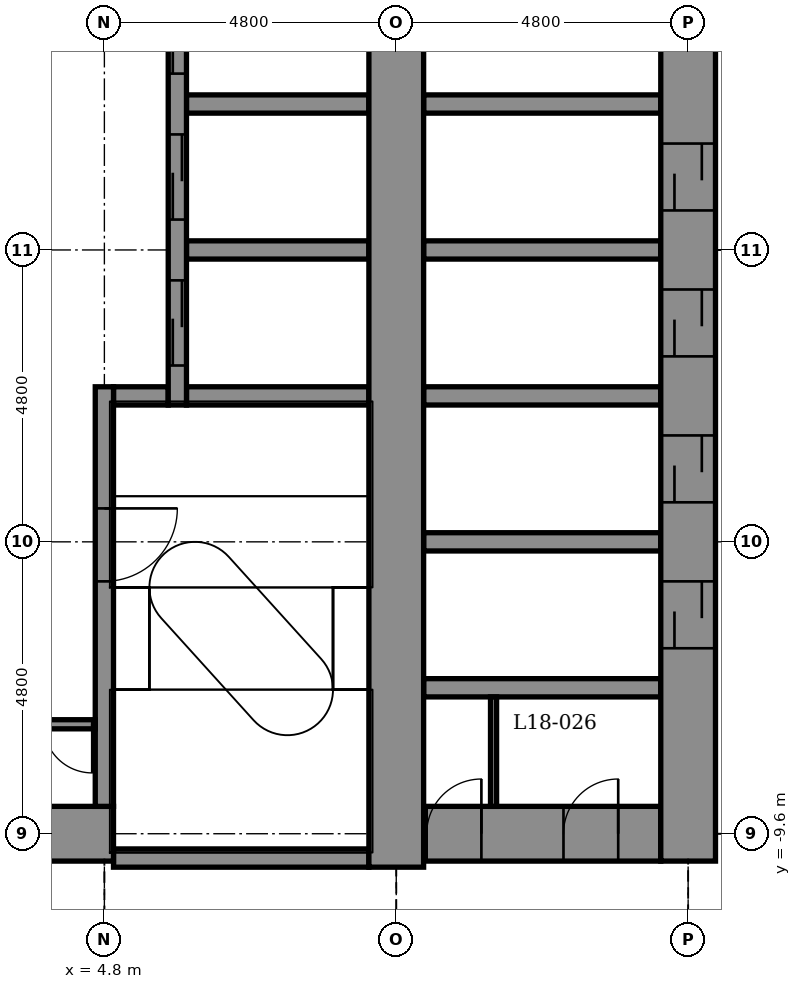
"""IFC4 building model, lengths in metres.
Left out: names, types, materials, properties, quantities, classifications, styles, units other than length and angle.
Written with IfcOpenShell. Run it as: python <this file> out.ifc"""

import sys

from ifc_helpers import new_model, si_unit, direction, frame, frame_2d, origin, place, context, subcontext, project, spatial, rectangle, extrude, element, fill, save


model = new_model("IFC4")
c1 = context("Model", 3, precision=1e-05, world=origin(), true_north=direction((0.0, 1.0)))
c2 = subcontext(c1, "Body", "Model", "MODEL_VIEW")
j1 = project(units=[si_unit("LENGTHUNIT", "METRE"), si_unit("PLANEANGLEUNIT", "RADIAN")], contexts=[c1])
p1 = place(None, origin())
s1 = spatial("IfcSite", under=j1, at=p1, CompositionType="ELEMENT")
p2 = place(p1, origin())
s2 = spatial("IfcBuilding", under=s1, at=p2, CompositionType="ELEMENT")
p3 = place(p2, frame((0.0, 0.0, 95.9)))
s3 = spatial("IfcBuildingStorey", under=s2, at=p3, CompositionType="ELEMENT", Elevation=95.9)
p4 = place(p3, frame((4.95, -10.0, -0.2), z_axis=(0.0, 0.0, 1.0), x_axis=(1.0, 0.0, 0.0)))
e1 = element("IfcWall", 1, at=p4, inside=s3, PredefinedType="STANDARD", context=c2, shape_type="SweptSolid", body=[
    extrude(rectangle(XDim=4.2, YDim=0.3, at=frame_2d((2.1, 0.0))), origin(), (0.0, 0.0, 1.0), 4.5),
])
p5 = place(p3, frame((-5.25, -9.6, -0.2), z_axis=(0.0, 0.0, 1.0), x_axis=(1.0, 0.0, 0.0)))
e2 = element("IfcWall", 2, at=p5, inside=s3, PredefinedType="SHEAR", context=c2, shape_type="SweptSolid", body=[
    extrude(rectangle(XDim=10.2, YDim=0.9, at=frame_2d((5.1, 0.0))), origin(), (0.0, 0.0, 1.0), 4.5),
])
p6 = place(p5, frame((0.6, 0.0, 0.2)))
e3 = element("IfcOpeningElement", 3, at=p6, cuts=e2, PredefinedType="OPENING", context=c2, shape_type="SweptSolid", body=[
    extrude(rectangle(XDim=0.9, YDim=2.1, at=frame_2d((0.45, 1.05))), frame((0.0, 0.46, 0.0), z_axis=(0.0, -1.0, 0.0), x_axis=(1.0, 0.0, 0.0)), (0.0, 0.0, 1.0), 0.92),
])
p7 = place(p3, frame((10.05, -9.6, -0.2), z_axis=(0.0, 0.0, 1.0), x_axis=(1.0, 0.0, 0.0)))
e4 = element("IfcWall", 4, at=p7, inside=s3, PredefinedType="SHEAR", context=c2, shape_type="SweptSolid", body=[
    extrude(rectangle(XDim=3.9, YDim=0.9, at=frame_2d((1.95, 0.0))), origin(), (0.0, 0.0, 1.0), 4.5),
])
p8 = place(p7, frame((0.05, 0.0, 0.2)))
e5 = element("IfcOpeningElement", 5, at=p8, cuts=e4, PredefinedType="OPENING", context=c2, shape_type="SweptSolid", body=[
    extrude(rectangle(XDim=0.9, YDim=2.1, at=frame_2d((0.45, 1.05))), frame((0.0, 0.46, 0.0), z_axis=(0.0, -1.0, 0.0), x_axis=(1.0, 0.0, 0.0)), (0.0, 0.0, 1.0), 0.92),
])
p9 = place(p7, frame((2.3, 0.0, 0.2)))
e6 = element("IfcOpeningElement", 6, at=p9, cuts=e4, PredefinedType="OPENING", context=c2, shape_type="SweptSolid", body=[
    extrude(rectangle(XDim=0.9, YDim=2.1, at=frame_2d((0.45, 1.05))), frame((0.0, 0.46, 0.0), z_axis=(0.0, -1.0, 0.0), x_axis=(1.0, 0.0, 0.0)), (0.0, 0.0, 1.0), 0.92),
])
for number, where, z_axis, x_axis in (
    (7, (10.05, -7.2, -0.2), (0.0, 0.0, 1.0), (1.0, 0.0, 0.0)),
    (8, (10.05, -4.8, -0.2), (0.0, 0.0, 1.0), (1.0, 0.0, 0.0)),
):
    element("IfcWall", number, at=place(p3, frame(where, z_axis=z_axis, x_axis=x_axis)), inside=s3, PredefinedType="STANDARD", context=c2, shape_type="SweptSolid", body=[
        extrude(rectangle(XDim=3.9, YDim=0.3, at=frame_2d((1.95, 0.0))), origin(), (0.0, 0.0, 1.0), 4.5),
    ])
p10 = place(p3, frame((4.95, -2.4, -0.2), z_axis=(0.0, 0.0, 1.0), x_axis=(1.0, 0.0, 0.0)))
e9 = element("IfcWall", 9, at=p10, inside=s3, PredefinedType="STANDARD", context=c2, shape_type="SweptSolid", body=[
    extrude(rectangle(XDim=0.9, YDim=0.3, at=frame_2d((0.45, 0.0))), origin(), (0.0, 0.0, 1.0), 4.5),
])
p11 = place(p3, frame((6.15, -2.4, -0.2), z_axis=(0.0, 0.0, 1.0), x_axis=(1.0, 0.0, 0.0)))
e10 = element("IfcWall", 10, at=p11, inside=s3, PredefinedType="STANDARD", context=c2, shape_type="SweptSolid", body=[
    extrude(rectangle(XDim=3.0, YDim=0.3, at=frame_2d((1.5, 0.0))), origin(), (0.0, 0.0, 1.0), 4.5),
])
p12 = place(p3, frame((10.05, -2.4, -0.2), z_axis=(0.0, 0.0, 1.0), x_axis=(1.0, 0.0, 0.0)))
e11 = element("IfcWall", 11, at=p12, inside=s3, PredefinedType="STANDARD", context=c2, shape_type="SweptSolid", body=[
    extrude(rectangle(XDim=3.9, YDim=0.3, at=frame_2d((1.95, 0.0))), origin(), (0.0, 0.0, 1.0), 4.5),
])
p13 = place(p3, frame((6.15, 0.0, -0.2), z_axis=(0.0, 0.0, 1.0), x_axis=(1.0, 0.0, 0.0)))
e12 = element("IfcWall", 12, at=p13, inside=s3, PredefinedType="STANDARD", context=c2, shape_type="SweptSolid", body=[
    extrude(rectangle(XDim=3.0, YDim=0.3, at=frame_2d((1.5, 0.0))), origin(), (0.0, 0.0, 1.0), 4.5),
])
p14 = place(p3, frame((10.05, 0.0, -0.2), z_axis=(0.0, 0.0, 1.0), x_axis=(1.0, 0.0, 0.0)))
e13 = element("IfcWall", 13, at=p14, inside=s3, PredefinedType="STANDARD", context=c2, shape_type="SweptSolid", body=[
    extrude(rectangle(XDim=3.9, YDim=0.3, at=frame_2d((1.95, 0.0))), origin(), (0.0, 0.0, 1.0), 4.5),
])
p15 = place(p3, frame((6.15, 2.4, -0.2), z_axis=(0.0, 0.0, 1.0), x_axis=(1.0, 0.0, 0.0)))
e14 = element("IfcWall", 14, at=p15, inside=s3, PredefinedType="STANDARD", context=c2, shape_type="SweptSolid", body=[
    extrude(rectangle(XDim=3.0, YDim=0.3, at=frame_2d((1.5, 0.0))), origin(), (0.0, 0.0, 1.0), 4.5),
])
p16 = place(p3, frame((10.05, 2.4, -0.2), z_axis=(0.0, 0.0, 1.0), x_axis=(1.0, 0.0, 0.0)))
e15 = element("IfcWall", 15, at=p16, inside=s3, PredefinedType="STANDARD", context=c2, shape_type="SweptSolid", body=[
    extrude(rectangle(XDim=3.9, YDim=0.3, at=frame_2d((1.95, 0.0))), origin(), (0.0, 0.0, 1.0), 4.5),
])
p17 = place(p3, frame((4.8, -9.15, -0.2), z_axis=(0.0, 0.0, 1.0), x_axis=(0.0, 1.0, 0.0)))
e16 = element("IfcWall", 16, at=p17, inside=s3, PredefinedType="STANDARD", context=c2, shape_type="SweptSolid", body=[
    extrude(rectangle(XDim=6.9, YDim=0.3, at=frame_2d((3.45, 0.0))), origin(), (0.0, 0.0, 1.0), 4.5),
])
p18 = place(p17, frame((3.7, 0.0, 0.2)))
e17 = element("IfcOpeningElement", 17, at=p18, cuts=e16, PredefinedType="OPENING", context=c2, shape_type="SweptSolid", body=[
    extrude(rectangle(XDim=1.2, YDim=2.1, at=frame_2d((0.6, 1.05))), frame((0.0, 0.16, 0.0), z_axis=(0.0, -1.0, 0.0), x_axis=(1.0, 0.0, 0.0)), (0.0, 0.0, 1.0), 0.32),
])
p19 = place(p3, frame((6.0, -2.55, -0.2), z_axis=(0.0, 0.0, 1.0), x_axis=(0.0, 1.0, 0.0)))
e18 = element("IfcWall", 18, at=p19, inside=s3, PredefinedType="STANDARD", context=c2, shape_type="SweptSolid", body=[
    extrude(rectangle(XDim=7.5, YDim=0.3, at=frame_2d((3.75, 0.0))), origin(), (0.0, 0.0, 1.0), 4.5),
])
p20 = place(p19, frame((0.65, 0.0, 0.2)))
e19 = element("IfcOpeningElement", 19, at=p20, cuts=e18, PredefinedType="OPENING", context=c2, shape_type="SweptSolid", body=[
    extrude(rectangle(XDim=1.4, YDim=2.1, at=frame_2d((0.7, 1.05))), frame((0.0, 0.16, 0.0), z_axis=(0.0, -1.0, 0.0), x_axis=(1.0, 0.0, 0.0)), (0.0, 0.0, 1.0), 0.32),
])
p21 = place(p19, frame((3.05, 0.0, 0.2)))
e20 = element("IfcOpeningElement", 20, at=p21, cuts=e18, PredefinedType="OPENING", context=c2, shape_type="SweptSolid", body=[
    extrude(rectangle(XDim=1.4, YDim=2.1, at=frame_2d((0.7, 1.05))), frame((0.0, 0.16, 0.0), z_axis=(0.0, -1.0, 0.0), x_axis=(1.0, 0.0, 0.0)), (0.0, 0.0, 1.0), 0.32),
])
p22 = place(p19, frame((5.45, 0.0, 0.2)))
e21 = element("IfcOpeningElement", 21, at=p22, cuts=e18, PredefinedType="OPENING", context=c2, shape_type="SweptSolid", body=[
    extrude(rectangle(XDim=1.4, YDim=2.1, at=frame_2d((0.7, 1.05))), frame((0.0, 0.16, 0.0), z_axis=(0.0, -1.0, 0.0), x_axis=(1.0, 0.0, 0.0)), (0.0, 0.0, 1.0), 0.32),
])
p23 = place(p3, frame((9.6, -10.15, -0.2), z_axis=(0.0, 0.0, 1.0), x_axis=(0.0, 1.0, 0.0)))
e22 = element("IfcWall", 22, at=p23, inside=s3, PredefinedType="SHEAR", context=c2, shape_type="SweptSolid", body=[
    extrude(rectangle(XDim=20.2, YDim=0.9, at=frame_2d((10.1, 0.0))), origin(), (0.0, 0.0, 1.0), 4.5),
])
p24 = place(p3, frame((14.4, -10.05, -0.2), z_axis=(0.0, 0.0, 1.0), x_axis=(0.0, 1.0, 0.0)))
e23 = element("IfcWall", 23, at=p24, inside=s3, PredefinedType="SHEAR", context=c2, shape_type="SweptSolid", body=[
    extrude(rectangle(XDim=20.1, YDim=0.9, at=frame_2d((10.05, 0.0))), origin(), (0.0, 0.0, 1.0), 4.5),
])
p25 = place(p24, frame((3.5, 0.0, 0.2)))
e24 = element("IfcOpeningElement", 24, at=p25, cuts=e23, PredefinedType="OPENING", context=c2, shape_type="SweptSolid", body=[
    extrude(rectangle(XDim=1.1, YDim=2.1, at=frame_2d((0.55, 1.05))), frame((0.0, 0.46, 0.0), z_axis=(0.0, -1.0, 0.0), x_axis=(1.0, 0.0, 0.0)), (0.0, 0.0, 1.0), 0.92),
])
p26 = place(p24, frame((5.9, 0.0, 0.2)))
e25 = element("IfcOpeningElement", 25, at=p26, cuts=e23, PredefinedType="OPENING", context=c2, shape_type="SweptSolid", body=[
    extrude(rectangle(XDim=1.1, YDim=2.1, at=frame_2d((0.55, 1.05))), frame((0.0, 0.46, 0.0), z_axis=(0.0, -1.0, 0.0), x_axis=(1.0, 0.0, 0.0)), (0.0, 0.0, 1.0), 0.92),
])
p27 = place(p24, frame((8.3, 0.0, 0.2)))
e26 = element("IfcOpeningElement", 26, at=p27, cuts=e23, PredefinedType="OPENING", context=c2, shape_type="SweptSolid", body=[
    extrude(rectangle(XDim=1.1, YDim=2.1, at=frame_2d((0.55, 1.05))), frame((0.0, 0.46, 0.0), z_axis=(0.0, -1.0, 0.0), x_axis=(1.0, 0.0, 0.0)), (0.0, 0.0, 1.0), 0.92),
])
p28 = place(p24, frame((10.7, 0.0, 0.2)))
e27 = element("IfcOpeningElement", 27, at=p28, cuts=e23, PredefinedType="OPENING", context=c2, shape_type="SweptSolid", body=[
    extrude(rectangle(XDim=1.1, YDim=2.1, at=frame_2d((0.55, 1.05))), frame((0.0, 0.46, 0.0), z_axis=(0.0, -1.0, 0.0), x_axis=(1.0, 0.0, 0.0)), (0.0, 0.0, 1.0), 0.92),
])
p29 = place(p3, frame((11.2, -9.15, 0.0), z_axis=(0.0, 0.0, 1.0), x_axis=(0.0, 1.0, 0.0)))
e28 = element("IfcWall", 28, at=p29, inside=s3, PredefinedType="PARTITIONING", context=c2, shape_type="SweptSolid", body=[
    extrude(rectangle(XDim=1.8, YDim=0.1, at=frame_2d((0.9, 0.0))), origin(), (0.0, 0.0, 1.0), 4.3),
])
p30 = place(p3, frame((3.75, -7.8, 0.0), z_axis=(0.0, 0.0, 1.0), x_axis=(1.0, 0.0, 0.0)))
e29 = element("IfcWall", 29, at=p30, inside=s3, PredefinedType="PARTITIONING", context=c2, shape_type="SweptSolid", body=[
    extrude(rectangle(XDim=0.9, YDim=0.15, at=frame_2d((0.45, 0.0))), origin(), (0.0, 0.0, 1.0), 4.3),
])
p31 = place(p30, frame((0.05, 0.0, 0.0)))
e30 = element("IfcOpeningElement", 30, at=p31, cuts=e29, PredefinedType="OPENING", context=c2, shape_type="SweptSolid", body=[
    extrude(rectangle(XDim=0.8, YDim=2.1, at=frame_2d((0.4, 1.05))), frame((0.0, 0.085, 0.0), z_axis=(0.0, -1.0, 0.0), x_axis=(1.0, 0.0, 0.0)), (0.0, 0.0, 1.0), 0.17),
])
p32 = place(p31, frame((0.8, 0.0, 0.0), z_axis=(0.0, 0.0, 1.0), x_axis=(-1.0, 0.0, 0.0)))
e31 = element("IfcDoor", 31, at=p32, inside=s3, OperationType="SINGLE_SWING_RIGHT", PredefinedType="DOOR", context=c2, shape_type="SweptSolid", body=[
    extrude(rectangle(XDim=0.8, YDim=2.1, at=frame_2d((0.4, 1.05))), frame((0.0, 0.025, 0.0), z_axis=(0.0, -1.0, 0.0), x_axis=(1.0, 0.0, 0.0)), (0.0, 0.0, 1.0), 0.05),
])
fill(e30, e31)
p33 = place(p20, origin())
e32 = element("IfcDoor", 32, at=p33, inside=s3, OperationType="DOUBLE_DOOR_SLIDING", PredefinedType="DOOR", context=c2, shape_type="SweptSolid", body=[
    extrude(rectangle(XDim=1.4, YDim=2.1, at=frame_2d((0.7, 1.05))), frame((0.0, 0.025, 0.0), z_axis=(0.0, -1.0, 0.0), x_axis=(1.0, 0.0, 0.0)), (0.0, 0.0, 1.0), 0.05),
])
fill(e19, e32)
p34 = place(p21, origin())
e33 = element("IfcDoor", 33, at=p34, inside=s3, OperationType="DOUBLE_DOOR_SLIDING", PredefinedType="DOOR", context=c2, shape_type="SweptSolid", body=[
    extrude(rectangle(XDim=1.4, YDim=2.1, at=frame_2d((0.7, 1.05))), frame((0.0, 0.025, 0.0), z_axis=(0.0, -1.0, 0.0), x_axis=(1.0, 0.0, 0.0)), (0.0, 0.0, 1.0), 0.05),
])
fill(e20, e33)
p35 = place(p22, origin())
e34 = element("IfcDoor", 34, at=p35, inside=s3, OperationType="DOUBLE_DOOR_SLIDING", PredefinedType="DOOR", context=c2, shape_type="SweptSolid", body=[
    extrude(rectangle(XDim=1.4, YDim=2.1, at=frame_2d((0.7, 1.05))), frame((0.0, 0.025, 0.0), z_axis=(0.0, -1.0, 0.0), x_axis=(1.0, 0.0, 0.0)), (0.0, 0.0, 1.0), 0.05),
])
fill(e21, e34)
p36 = place(p25, origin())
e35 = element("IfcDoor", 35, at=p36, inside=s3, OperationType="DOUBLE_DOOR_SLIDING", PredefinedType="DOOR", context=c2, shape_type="SweptSolid", body=[
    extrude(rectangle(XDim=1.1, YDim=2.1, at=frame_2d((0.55, 1.05))), frame((0.0, 0.025, 0.0), z_axis=(0.0, -1.0, 0.0), x_axis=(1.0, 0.0, 0.0)), (0.0, 0.0, 1.0), 0.05),
])
fill(e24, e35)
p37 = place(p26, origin())
e36 = element("IfcDoor", 36, at=p37, inside=s3, OperationType="DOUBLE_DOOR_SLIDING", PredefinedType="DOOR", context=c2, shape_type="SweptSolid", body=[
    extrude(rectangle(XDim=1.1, YDim=2.1, at=frame_2d((0.55, 1.05))), frame((0.0, 0.025, 0.0), z_axis=(0.0, -1.0, 0.0), x_axis=(1.0, 0.0, 0.0)), (0.0, 0.0, 1.0), 0.05),
])
fill(e25, e36)
p38 = place(p27, origin())
e37 = element("IfcDoor", 37, at=p38, inside=s3, OperationType="DOUBLE_DOOR_SLIDING", PredefinedType="DOOR", context=c2, shape_type="SweptSolid", body=[
    extrude(rectangle(XDim=1.1, YDim=2.1, at=frame_2d((0.55, 1.05))), frame((0.0, 0.025, 0.0), z_axis=(0.0, -1.0, 0.0), x_axis=(1.0, 0.0, 0.0)), (0.0, 0.0, 1.0), 0.05),
])
fill(e26, e37)
p39 = place(p28, origin())
e38 = element("IfcDoor", 38, at=p39, inside=s3, OperationType="DOUBLE_DOOR_SLIDING", PredefinedType="DOOR", context=c2, shape_type="SweptSolid", body=[
    extrude(rectangle(XDim=1.1, YDim=2.1, at=frame_2d((0.55, 1.05))), frame((0.0, 0.025, 0.0), z_axis=(0.0, -1.0, 0.0), x_axis=(1.0, 0.0, 0.0)), (0.0, 0.0, 1.0), 0.05),
])
fill(e27, e38)
p40 = place(p18, frame((1.2, 0.0, 0.0), z_axis=(0.0, 0.0, 1.0), x_axis=(-1.0, 0.0, 0.0)))
e39 = element("IfcDoor", 39, at=p40, inside=s3, OperationType="SINGLE_SWING_RIGHT", PredefinedType="DOOR", context=c2, shape_type="SweptSolid", body=[
    extrude(rectangle(XDim=1.2, YDim=2.1, at=frame_2d((0.6, 1.05))), frame((0.0, 0.025, 0.0), z_axis=(0.0, -1.0, 0.0), x_axis=(1.0, 0.0, 0.0)), (0.0, 0.0, 1.0), 0.05),
])
fill(e17, e39)
p41 = place(p8, origin())
e40 = element("IfcDoor", 40, at=p41, inside=s3, OperationType="SINGLE_SWING_RIGHT", PredefinedType="DOOR", context=c2, shape_type="SweptSolid", body=[
    extrude(rectangle(XDim=0.9, YDim=2.1, at=frame_2d((0.45, 1.05))), frame((0.0, 0.025, 0.0), z_axis=(0.0, -1.0, 0.0), x_axis=(1.0, 0.0, 0.0)), (0.0, 0.0, 1.0), 0.05),
])
fill(e5, e40)
p42 = place(p9, origin())
e41 = element("IfcDoor", 41, at=p42, inside=s3, OperationType="SINGLE_SWING_RIGHT", PredefinedType="DOOR", context=c2, shape_type="SweptSolid", body=[
    extrude(rectangle(XDim=0.9, YDim=2.1, at=frame_2d((0.45, 1.05))), frame((0.0, 0.025, 0.0), z_axis=(0.0, -1.0, 0.0), x_axis=(1.0, 0.0, 0.0)), (0.0, 0.0, 1.0), 0.05),
])
fill(e6, e41)
save(model, sys.argv[1])
